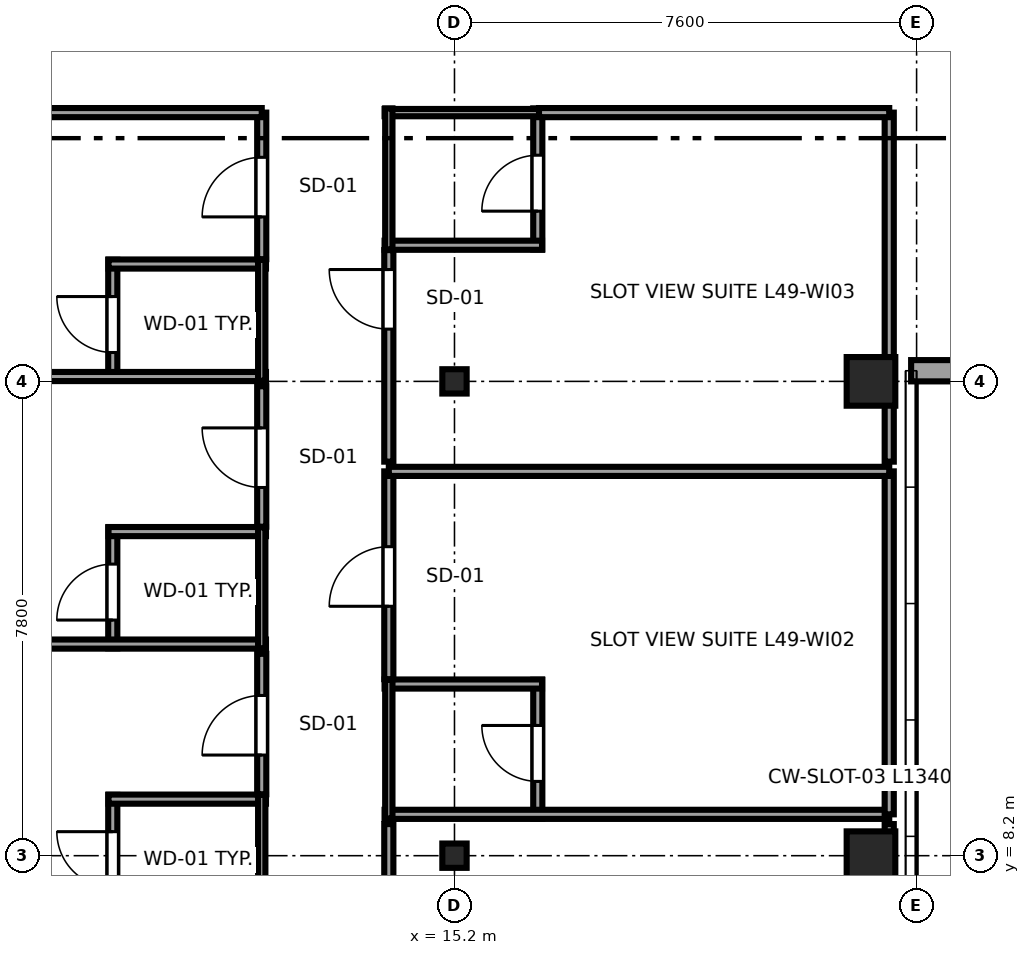
"""IFC4 building model, lengths in metres.
Left out: names, types, materials, properties, quantities, classifications, styles, units other than length and angle.
Written with IfcOpenShell. Run it as: python <this file> out.ifc"""

import sys

from ifc_helpers import new_model, si_unit, direction, frame, frame_2d, origin, origin_2d, place, context, subcontext, project, spatial, rectangle, i_section, extrude, source, transform, mapped, element, fill, save


model = new_model("IFC4")
c1 = context("Model", 3, precision=1e-05, world=origin(), true_north=direction((0.0, 1.0)))
c2 = subcontext(c1, "Body", "Model", "MODEL_VIEW")
j1 = project(units=[si_unit("LENGTHUNIT", "METRE"), si_unit("PLANEANGLEUNIT", "RADIAN")], contexts=[c1])
p1 = place(None, origin())
s1 = spatial("IfcSite", under=j1, at=p1, CompositionType="ELEMENT")
p2 = place(p1, origin())
s2 = spatial("IfcBuilding", under=s1, at=p2, CompositionType="ELEMENT")
p3 = place(p2, frame((0.0, 0.0, 187.55)))
s3 = spatial("IfcBuildingStorey", under=s2, at=p3, CompositionType="ELEMENT", Elevation=187.55)
m1 = source(origin(), c2, "Body", "SweptSolid", [
    extrude(i_section(OverallWidth=0.4, OverallDepth=0.4, WebThickness=0.02, FlangeThickness=0.035, at=origin_2d()), origin(), (0.0, 0.0, 1.0), 3.55),
])
for number, where, z_axis, x_axis in (
    (1, (15.2, 8.2, 0.0), (0.0, 0.0, 1.0), (1.0, 0.0, 0.0)),
    (2, (15.2, 16.0, 0.0), (0.0, 0.0, 1.0), (1.0, 0.0, 0.0)),
):
    element("IfcColumn", number, at=place(p3, frame(where, z_axis=z_axis, x_axis=x_axis)), inside=s3, PredefinedType="COLUMN", context=c2, shape_type="MappedRepresentation", body=[
        mapped(m1, transform((0.0, 0.0, 0.0), x_axis=(1.0, 0.0, 0.0), y_axis=(0.0, 1.0, 0.0), z_axis=(0.0, 0.0, 1.0), scale=1.0)),
    ])
m2 = source(origin(), c2, "Body", "SweptSolid", [
    extrude(rectangle(XDim=0.8, YDim=0.8, at=origin_2d()), origin(), (0.0, 0.0, 1.0), 3.55),
])
for number, where, z_axis, x_axis in (
    (3, (22.05, 8.2, 0.0), (0.0, 0.0, 1.0), (1.0, 0.0, 0.0)),
    (4, (22.05, 16.0, 0.0), (0.0, 0.0, 1.0), (1.0, 0.0, 0.0)),
):
    element("IfcColumn", number, at=place(p3, frame(where, z_axis=z_axis, x_axis=x_axis)), inside=s3, PredefinedType="COLUMN", context=c2, shape_type="MappedRepresentation", body=[
        mapped(m2, transform((0.0, 0.0, 0.0), x_axis=(1.0, 0.0, 0.0), y_axis=(0.0, 1.0, 0.0), z_axis=(0.0, 0.0, 1.0), scale=1.0)),
    ])
p4 = place(p3, frame((22.71, 16.175, 0.0), z_axis=(0.0, 0.0, 1.0), x_axis=(1.0, 0.0, 0.0)))
e5 = element("IfcWall", 5, at=p4, inside=s3, PredefinedType="SOLIDWALL", context=c2, shape_type="SweptSolid", body=[
    extrude(rectangle(XDim=11.58, YDim=0.35, at=frame_2d((5.79, 0.0))), origin(), (0.0, 0.0, 1.0), 2.758),
])
p5 = place(p4, frame((1.995, 0.0, 0.68)))
e6 = element("IfcOpeningElement", 6, at=p5, cuts=e5, PredefinedType="OPENING", context=c2, shape_type="SweptSolid", body=[
    extrude(rectangle(XDim=2.4, YDim=1.9, at=frame_2d((1.2, 0.95))), frame((0.0, 0.185, 0.0), z_axis=(0.0, -1.0, 0.0), x_axis=(1.0, 0.0, 0.0)), (0.0, 0.0, 1.0), 0.37),
])
p6 = place(p4, frame((7.185, 0.0, 0.68)))
e7 = element("IfcOpeningElement", 7, at=p6, cuts=e5, PredefinedType="OPENING", context=c2, shape_type="SweptSolid", body=[
    extrude(rectangle(XDim=2.4, YDim=1.9, at=frame_2d((1.2, 0.95))), frame((0.0, 0.185, 0.0), z_axis=(0.0, -1.0, 0.0), x_axis=(1.0, 0.0, 0.0)), (0.0, 0.0, 1.0), 0.37),
])
p7 = place(p3, frame((9.58, 7.21, 0.0), z_axis=(0.0, 0.0, 1.0), x_axis=(0.0, 1.0, 0.0)))
e8 = element("IfcWall", 8, at=p7, inside=s3, PredefinedType="PARTITIONING", context=c2, shape_type="SweptSolid", body=[
    extrude(rectangle(XDim=1.99, YDim=0.15, at=frame_2d((0.995, 0.0))), origin(), (0.0, 0.0, 1.0), 3.37),
])
p8 = place(p7, frame((0.465, 0.0, 0.0)))
e9 = element("IfcOpeningElement", 9, at=p8, cuts=e8, PredefinedType="OPENING", context=c2, shape_type="SweptSolid", body=[
    extrude(rectangle(XDim=0.92, YDim=2.01, at=frame_2d((0.46, 1.005))), frame((0.0, 0.085, 0.0), z_axis=(0.0, -1.0, 0.0), x_axis=(1.0, 0.0, 0.0)), (0.0, 0.0, 1.0), 0.17),
])
p9 = place(p3, frame((9.51, 9.13, 0.0), z_axis=(0.0, 0.0, 1.0), x_axis=(1.0, 0.0, 0.0)))
e10 = element("IfcWall", 10, at=p9, inside=s3, PredefinedType="PARTITIONING", context=c2, shape_type="SweptSolid", body=[
    extrude(rectangle(XDim=2.59, YDim=0.15, at=frame_2d((1.295, 0.0))), origin(), (0.0, 0.0, 1.0), 3.37),
])
p10 = place(p3, frame((12.03, 7.21, 0.0), z_axis=(0.0, 0.0, 1.0), x_axis=(0.0, 1.0, 0.0)))
e11 = element("IfcWall", 11, at=p10, inside=s3, PredefinedType="PLUMBINGWALL", context=c2, shape_type="SweptSolid", body=[
    extrude(rectangle(XDim=1.99, YDim=0.12, at=frame_2d((0.995, 0.0))), origin(), (0.0, 0.0, 1.0), 3.37),
])
p11 = place(p3, frame((9.58, 11.61, 0.0), z_axis=(0.0, 0.0, 1.0), x_axis=(0.0, 1.0, 0.0)))
e12 = element("IfcWall", 12, at=p11, inside=s3, PredefinedType="PARTITIONING", context=c2, shape_type="SweptSolid", body=[
    extrude(rectangle(XDim=1.99, YDim=0.15, at=frame_2d((0.995, 0.0))), origin(), (0.0, 0.0, 1.0), 3.37),
])
p12 = place(p11, frame((0.465, 0.0, 0.0)))
e13 = element("IfcOpeningElement", 13, at=p12, cuts=e12, PredefinedType="OPENING", context=c2, shape_type="SweptSolid", body=[
    extrude(rectangle(XDim=0.92, YDim=2.01, at=frame_2d((0.46, 1.005))), frame((0.0, 0.085, 0.0), z_axis=(0.0, -1.0, 0.0), x_axis=(1.0, 0.0, 0.0)), (0.0, 0.0, 1.0), 0.17),
])
p13 = place(p3, frame((3.005, 11.68, 0.0), z_axis=(0.0, 0.0, 1.0), x_axis=(1.0, 0.0, 0.0)))
e14 = element("IfcWall", 14, at=p13, inside=s3, PredefinedType="PARTITIONING", context=c2, shape_type="SweptSolid", body=[
    extrude(rectangle(XDim=9.095, YDim=0.15, at=frame_2d((4.548, 0.0))), origin(), (0.0, 0.0, 1.0), 3.37),
])
p14 = place(p3, frame((9.51, 13.53, 0.0), z_axis=(0.0, 0.0, 1.0), x_axis=(1.0, 0.0, 0.0)))
e15 = element("IfcWall", 15, at=p14, inside=s3, PredefinedType="PARTITIONING", context=c2, shape_type="SweptSolid", body=[
    extrude(rectangle(XDim=2.59, YDim=0.15, at=frame_2d((1.295, 0.0))), origin(), (0.0, 0.0, 1.0), 3.37),
])
p15 = place(p3, frame((12.03, 11.61, 0.0), z_axis=(0.0, 0.0, 1.0), x_axis=(0.0, 1.0, 0.0)))
e16 = element("IfcWall", 16, at=p15, inside=s3, PredefinedType="PLUMBINGWALL", context=c2, shape_type="SweptSolid", body=[
    extrude(rectangle(XDim=1.99, YDim=0.12, at=frame_2d((0.995, 0.0))), origin(), (0.0, 0.0, 1.0), 3.37),
])
p16 = place(p3, frame((9.58, 16.01, 0.0), z_axis=(0.0, 0.0, 1.0), x_axis=(0.0, 1.0, 0.0)))
e17 = element("IfcWall", 17, at=p16, inside=s3, PredefinedType="PARTITIONING", context=c2, shape_type="SweptSolid", body=[
    extrude(rectangle(XDim=1.99, YDim=0.15, at=frame_2d((0.995, 0.0))), origin(), (0.0, 0.0, 1.0), 3.37),
])
p17 = place(p16, frame((0.465, 0.0, 0.0)))
e18 = element("IfcOpeningElement", 18, at=p17, cuts=e17, PredefinedType="OPENING", context=c2, shape_type="SweptSolid", body=[
    extrude(rectangle(XDim=0.92, YDim=2.01, at=frame_2d((0.46, 1.005))), frame((0.0, 0.085, 0.0), z_axis=(0.0, -1.0, 0.0), x_axis=(1.0, 0.0, 0.0)), (0.0, 0.0, 1.0), 0.17),
])
p18 = place(p3, frame((3.005, 16.08, 0.0), z_axis=(0.0, 0.0, 1.0), x_axis=(1.0, 0.0, 0.0)))
e19 = element("IfcWall", 19, at=p18, inside=s3, PredefinedType="PARTITIONING", context=c2, shape_type="SweptSolid", body=[
    extrude(rectangle(XDim=9.095, YDim=0.15, at=frame_2d((4.548, 0.0))), origin(), (0.0, 0.0, 1.0), 2.758),
])
p19 = place(p3, frame((9.51, 17.93, 0.0), z_axis=(0.0, 0.0, 1.0), x_axis=(1.0, 0.0, 0.0)))
e20 = element("IfcWall", 20, at=p19, inside=s3, PredefinedType="PARTITIONING", context=c2, shape_type="SweptSolid", body=[
    extrude(rectangle(XDim=2.59, YDim=0.15, at=frame_2d((1.295, 0.0))), origin(), (0.0, 0.0, 1.0), 3.37),
])
p20 = place(p3, frame((12.03, 16.01, 0.0), z_axis=(0.0, 0.0, 1.0), x_axis=(0.0, 1.0, 0.0)))
e21 = element("IfcWall", 21, at=p20, inside=s3, PredefinedType="PLUMBINGWALL", context=c2, shape_type="SweptSolid", body=[
    extrude(rectangle(XDim=1.99, YDim=0.12, at=frame_2d((0.995, 0.0))), origin(), (0.0, 0.0, 1.0), 3.37),
])
p21 = place(p3, frame((16.57, 8.81, 0.0), z_axis=(0.0, 0.0, 1.0), x_axis=(0.0, 1.0, 0.0)))
e22 = element("IfcWall", 22, at=p21, inside=s3, PredefinedType="PARTITIONING", context=c2, shape_type="SweptSolid", body=[
    extrude(rectangle(XDim=2.283, YDim=0.15, at=frame_2d((1.142, 0.0))), origin(), (0.0, 0.0, 1.0), 3.37),
])
p22 = place(p21, frame((0.612, 0.0, 0.0)))
e23 = element("IfcOpeningElement", 23, at=p22, cuts=e22, PredefinedType="OPENING", context=c2, shape_type="SweptSolid", body=[
    extrude(rectangle(XDim=0.92, YDim=2.01, at=frame_2d((0.46, 1.005))), frame((0.0, 0.085, 0.0), z_axis=(0.0, -1.0, 0.0), x_axis=(1.0, 0.0, 0.0)), (0.0, 0.0, 1.0), 0.17),
])
p23 = place(p3, frame((14.05, 8.88, 0.0), z_axis=(0.0, 0.0, 1.0), x_axis=(1.0, 0.0, 0.0)))
e24 = element("IfcWall", 24, at=p23, inside=s3, PredefinedType="PARTITIONING", context=c2, shape_type="SweptSolid", body=[
    extrude(rectangle(XDim=8.3, YDim=0.15, at=frame_2d((4.15, 0.0))), origin(), (0.0, 0.0, 1.0), 3.37),
])
p24 = place(p3, frame((14.05, 11.023, 0.0), z_axis=(0.0, 0.0, 1.0), x_axis=(1.0, 0.0, 0.0)))
e25 = element("IfcWall", 25, at=p24, inside=s3, PredefinedType="PARTITIONING", context=c2, shape_type="SweptSolid", body=[
    extrude(rectangle(XDim=2.59, YDim=0.15, at=frame_2d((1.295, 0.0))), origin(), (0.0, 0.0, 1.0), 3.37),
])
p25 = place(p3, frame((14.12, 8.81, 0.0), z_axis=(0.0, 0.0, 1.0), x_axis=(0.0, 1.0, 0.0)))
e26 = element("IfcWall", 26, at=p25, inside=s3, PredefinedType="PLUMBINGWALL", context=c2, shape_type="SweptSolid", body=[
    extrude(rectangle(XDim=2.283, YDim=0.12, at=frame_2d((1.142, 0.0))), origin(), (0.0, 0.0, 1.0), 3.37),
])
p26 = place(p3, frame((16.57, 18.169, 0.0), z_axis=(0.0, 0.0, 1.0), x_axis=(0.0, 1.0, 0.0)))
e27 = element("IfcWall", 27, at=p26, inside=s3, PredefinedType="PARTITIONING", context=c2, shape_type="SweptSolid", body=[
    extrude(rectangle(XDim=2.321, YDim=0.15, at=frame_2d((1.161, 0.0))), origin(), (0.0, 0.0, 1.0), 3.37),
])
p27 = place(p26, frame((0.631, 0.0, 0.0)))
e28 = element("IfcOpeningElement", 28, at=p27, cuts=e27, PredefinedType="OPENING", context=c2, shape_type="SweptSolid", body=[
    extrude(rectangle(XDim=0.92, YDim=2.01, at=frame_2d((0.46, 1.005))), frame((0.0, 0.085, 0.0), z_axis=(0.0, -1.0, 0.0), x_axis=(1.0, 0.0, 0.0)), (0.0, 0.0, 1.0), 0.17),
])
p28 = place(p3, frame((14.05, 18.239, 0.0), z_axis=(0.0, 0.0, 1.0), x_axis=(1.0, 0.0, 0.0)))
e29 = element("IfcWall", 29, at=p28, inside=s3, PredefinedType="PARTITIONING", context=c2, shape_type="SweptSolid", body=[
    extrude(rectangle(XDim=2.59, YDim=0.15, at=frame_2d((1.295, 0.0))), origin(), (0.0, 0.0, 1.0), 3.37),
])
p29 = place(p3, frame((14.05, 20.42, 0.0), z_axis=(0.0, 0.0, 1.0), x_axis=(1.0, 0.0, 0.0)))
e30 = element("IfcWall", 30, at=p29, inside=s3, PredefinedType="PLUMBINGWALL", context=c2, shape_type="SweptSolid", body=[
    extrude(rectangle(XDim=2.59, YDim=0.12, at=frame_2d((1.295, 0.0))), origin(), (0.0, 0.0, 1.0), 3.37),
])
p30 = place(p3, frame((14.12, 18.169, 0.0), z_axis=(0.0, 0.0, 1.0), x_axis=(0.0, 1.0, 0.0)))
e31 = element("IfcWall", 31, at=p30, inside=s3, PredefinedType="PLUMBINGWALL", context=c2, shape_type="SweptSolid", body=[
    extrude(rectangle(XDim=2.321, YDim=0.12, at=frame_2d((1.161, 0.0))), origin(), (0.0, 0.0, 1.0), 3.37),
])
p31 = place(p3, frame((12.03, 9.21, 0.0), z_axis=(0.0, 0.0, 1.0), x_axis=(0.0, 1.0, 0.0)))
e32 = element("IfcWall", 32, at=p31, inside=s3, PredefinedType="PARTITIONING", context=c2, shape_type="SweptSolid", body=[
    extrude(rectangle(XDim=2.31, YDim=0.15, at=frame_2d((1.155, 0.0))), origin(), (0.0, 0.0, 1.0), 3.37),
])
p32 = place(p31, frame((0.645, 0.0, 0.0)))
e33 = element("IfcOpeningElement", 33, at=p32, cuts=e32, PredefinedType="OPENING", context=c2, shape_type="SweptSolid", body=[
    extrude(rectangle(XDim=0.98, YDim=2.12, at=frame_2d((0.49, 1.06))), frame((0.0, 0.085, 0.0), z_axis=(0.0, -1.0, 0.0), x_axis=(1.0, 0.0, 0.0)), (0.0, 0.0, 1.0), 0.17),
])
p33 = place(p3, frame((12.03, 13.61, 0.0), z_axis=(0.0, 0.0, 1.0), x_axis=(0.0, 1.0, 0.0)))
e34 = element("IfcWall", 34, at=p33, inside=s3, PredefinedType="PARTITIONING", context=c2, shape_type="SweptSolid", body=[
    extrude(rectangle(XDim=2.31, YDim=0.15, at=frame_2d((1.155, 0.0))), origin(), (0.0, 0.0, 1.0), 3.37),
])
p34 = place(p33, frame((0.645, 0.0, 0.0)))
e35 = element("IfcOpeningElement", 35, at=p34, cuts=e34, PredefinedType="OPENING", context=c2, shape_type="SweptSolid", body=[
    extrude(rectangle(XDim=0.98, YDim=2.12, at=frame_2d((0.49, 1.06))), frame((0.0, 0.085, 0.0), z_axis=(0.0, -1.0, 0.0), x_axis=(1.0, 0.0, 0.0)), (0.0, 0.0, 1.0), 0.17),
])
p35 = place(p3, frame((12.03, 18.01, 0.0), z_axis=(0.0, 0.0, 1.0), x_axis=(0.0, 1.0, 0.0)))
e36 = element("IfcWall", 36, at=p35, inside=s3, PredefinedType="PARTITIONING", context=c2, shape_type="SweptSolid", body=[
    extrude(rectangle(XDim=2.41, YDim=0.15, at=frame_2d((1.205, 0.0))), origin(), (0.0, 0.0, 1.0), 3.37),
])
p36 = place(p35, frame((0.695, 0.0, 0.0)))
e37 = element("IfcOpeningElement", 37, at=p36, cuts=e36, PredefinedType="OPENING", context=c2, shape_type="SweptSolid", body=[
    extrude(rectangle(XDim=0.98, YDim=2.12, at=frame_2d((0.49, 1.06))), frame((0.0, 0.085, 0.0), z_axis=(0.0, -1.0, 0.0), x_axis=(1.0, 0.0, 0.0)), (0.0, 0.0, 1.0), 0.17),
])
p37 = place(p3, frame((3.005, 20.42, 0.0), z_axis=(0.0, 0.0, 1.0), x_axis=(1.0, 0.0, 0.0)))
e38 = element("IfcWall", 38, at=p37, inside=s3, PredefinedType="PARTITIONING", context=c2, shape_type="SweptSolid", body=[
    extrude(rectangle(XDim=9.025, YDim=0.15, at=frame_2d((4.513, 0.0))), origin(), (0.0, 0.0, 1.0), 3.37),
])
p38 = place(p3, frame((14.12, 5.867, 0.0), z_axis=(0.0, 0.0, 1.0), x_axis=(0.0, 1.0, 0.0)))
e39 = element("IfcWall", 39, at=p38, inside=s3, PredefinedType="PARTITIONING", context=c2, shape_type="SweptSolid", body=[
    extrude(rectangle(XDim=2.853, YDim=0.15, at=frame_2d((1.427, 0.0))), origin(), (0.0, 0.0, 1.0), 3.37),
])
p39 = place(p38, frame((0.316, 0.0, 0.0)))
e40 = element("IfcOpeningElement", 40, at=p39, cuts=e39, PredefinedType="OPENING", context=c2, shape_type="SweptSolid", body=[
    extrude(rectangle(XDim=0.98, YDim=2.12, at=frame_2d((0.49, 1.06))), frame((0.0, 0.085, 0.0), z_axis=(0.0, -1.0, 0.0), x_axis=(1.0, 0.0, 0.0)), (0.0, 0.0, 1.0), 0.17),
])
p40 = place(p3, frame((22.35, 3.005, 0.0), z_axis=(0.0, 0.0, 1.0), x_axis=(0.0, 1.0, 0.0)))
e41 = element("IfcWall", 41, at=p40, inside=s3, PredefinedType="PARTITIONING", context=c2, shape_type="SweptSolid", body=[
    extrude(rectangle(XDim=5.715, YDim=0.15, at=frame_2d((2.857, 0.0))), origin(), (0.0, 0.0, 1.0), 3.37),
])
p41 = place(p3, frame((14.12, 11.103, 0.0), z_axis=(0.0, 0.0, 1.0), x_axis=(0.0, 1.0, 0.0)))
e42 = element("IfcWall", 42, at=p41, inside=s3, PredefinedType="PARTITIONING", context=c2, shape_type="SweptSolid", body=[
    extrude(rectangle(XDim=3.417, YDim=0.15, at=frame_2d((1.708, 0.0))), origin(), (0.0, 0.0, 1.0), 3.37),
])
p42 = place(p41, frame((1.198, 0.0, 0.0)))
e43 = element("IfcOpeningElement", 43, at=p42, cuts=e42, PredefinedType="OPENING", context=c2, shape_type="SweptSolid", body=[
    extrude(rectangle(XDim=0.98, YDim=2.12, at=frame_2d((0.49, 1.06))), frame((0.0, 0.085, 0.0), z_axis=(0.0, -1.0, 0.0), x_axis=(1.0, 0.0, 0.0)), (0.0, 0.0, 1.0), 0.17),
])
p43 = place(p3, frame((22.35, 8.88, 0.0), z_axis=(0.0, 0.0, 1.0), x_axis=(0.0, 1.0, 0.0)))
e44 = element("IfcWall", 44, at=p43, inside=s3, PredefinedType="PARTITIONING", context=c2, shape_type="SweptSolid", body=[
    extrude(rectangle(XDim=5.64, YDim=0.15, at=frame_2d((2.82, 0.0))), origin(), (0.0, 0.0, 1.0), 3.37),
])
p44 = place(p3, frame((14.12, 14.52, 0.0), z_axis=(0.0, 0.0, 1.0), x_axis=(1.0, 0.0, 0.0)))
e45 = element("IfcWall", 45, at=p44, inside=s3, PredefinedType="PARTITIONING", context=c2, shape_type="SweptSolid", body=[
    extrude(rectangle(XDim=8.23, YDim=0.15, at=frame_2d((4.115, 0.0))), origin(), (0.0, 0.0, 1.0), 3.37),
])
p45 = place(p3, frame((14.12, 14.68, 0.0), z_axis=(0.0, 0.0, 1.0), x_axis=(0.0, 1.0, 0.0)))
e46 = element("IfcWall", 46, at=p45, inside=s3, PredefinedType="PARTITIONING", context=c2, shape_type="SweptSolid", body=[
    extrude(rectangle(XDim=3.479, YDim=0.15, at=frame_2d((1.74, 0.0))), origin(), (0.0, 0.0, 1.0), 3.37),
])
p46 = place(p45, frame((2.179, 0.0, 0.0)))
e47 = element("IfcOpeningElement", 47, at=p46, cuts=e46, PredefinedType="OPENING", context=c2, shape_type="SweptSolid", body=[
    extrude(rectangle(XDim=0.98, YDim=2.12, at=frame_2d((0.49, 1.06))), frame((0.0, 0.085, 0.0), z_axis=(0.0, -1.0, 0.0), x_axis=(1.0, 0.0, 0.0)), (0.0, 0.0, 1.0), 0.17),
])
p47 = place(p3, frame((22.35, 14.68, 0.0), z_axis=(0.0, 0.0, 1.0), x_axis=(0.0, 1.0, 0.0)))
e48 = element("IfcWall", 48, at=p47, inside=s3, PredefinedType="PARTITIONING", context=c2, shape_type="SweptSolid", body=[
    extrude(rectangle(XDim=5.74, YDim=0.15, at=frame_2d((2.87, 0.0))), origin(), (0.0, 0.0, 1.0), 3.37),
])
p48 = place(p3, frame((16.59, 20.42, 0.0), z_axis=(0.0, 0.0, 1.0), x_axis=(1.0, 0.0, 0.0)))
e49 = element("IfcWall", 49, at=p48, inside=s3, PredefinedType="PARTITIONING", context=c2, shape_type="SweptSolid", body=[
    extrude(rectangle(XDim=5.76, YDim=0.15, at=frame_2d((2.88, 0.0))), origin(), (0.0, 0.0, 1.0), 3.37),
])
m3 = source(origin(), c2, "Body", "SweptSolid", [
    extrude(rectangle(XDim=0.92, YDim=2.01, at=frame_2d((0.46, 1.005))), frame((0.0, 0.025, 0.0), z_axis=(0.0, -1.0, 0.0), x_axis=(1.0, 0.0, 0.0)), (0.0, 0.0, 1.0), 0.05),
])
p49 = place(p8, origin())
e50 = element("IfcDoor", 50, at=p49, inside=s3, OperationType="SINGLE_SWING_RIGHT", PredefinedType="DOOR", context=c2, shape_type="MappedRepresentation", body=[
    mapped(m3, transform((0.0, 0.0, 0.0), x_axis=(1.0, 0.0, 0.0), y_axis=(0.0, 1.0, 0.0), z_axis=(0.0, 0.0, 1.0), scale=1.0)),
])
fill(e9, e50)
p50 = place(p12, origin())
e51 = element("IfcDoor", 51, at=p50, inside=s3, OperationType="SINGLE_SWING_LEFT", PredefinedType="DOOR", context=c2, shape_type="MappedRepresentation", body=[
    mapped(m3, transform((0.0, 0.0, 0.0), x_axis=(1.0, 0.0, 0.0), y_axis=(0.0, 1.0, 0.0), z_axis=(0.0, 0.0, 1.0), scale=1.0)),
])
fill(e13, e51)
p51 = place(p17, origin())
e52 = element("IfcDoor", 52, at=p51, inside=s3, OperationType="SINGLE_SWING_RIGHT", PredefinedType="DOOR", context=c2, shape_type="MappedRepresentation", body=[
    mapped(m3, transform((0.0, 0.0, 0.0), x_axis=(1.0, 0.0, 0.0), y_axis=(0.0, 1.0, 0.0), z_axis=(0.0, 0.0, 1.0), scale=1.0)),
])
fill(e18, e52)
p52 = place(p22, origin())
e53 = element("IfcDoor", 53, at=p52, inside=s3, OperationType="SINGLE_SWING_RIGHT", PredefinedType="DOOR", context=c2, shape_type="MappedRepresentation", body=[
    mapped(m3, transform((0.0, 0.0, 0.0), x_axis=(1.0, 0.0, 0.0), y_axis=(0.0, 1.0, 0.0), z_axis=(0.0, 0.0, 1.0), scale=1.0)),
])
fill(e23, e53)
p53 = place(p27, origin())
e54 = element("IfcDoor", 54, at=p53, inside=s3, OperationType="SINGLE_SWING_LEFT", PredefinedType="DOOR", context=c2, shape_type="MappedRepresentation", body=[
    mapped(m3, transform((0.0, 0.0, 0.0), x_axis=(1.0, 0.0, 0.0), y_axis=(0.0, 1.0, 0.0), z_axis=(0.0, 0.0, 1.0), scale=1.0)),
])
fill(e28, e54)
m4 = source(origin(), c2, "Body", "SweptSolid", [
    extrude(rectangle(XDim=0.98, YDim=2.12, at=frame_2d((0.49, 1.06))), frame((0.0, 0.025, 0.0), z_axis=(0.0, -1.0, 0.0), x_axis=(1.0, 0.0, 0.0)), (0.0, 0.0, 1.0), 0.05),
])
p54 = place(p32, origin())
e55 = element("IfcDoor", 55, at=p54, inside=s3, OperationType="SINGLE_SWING_LEFT", PredefinedType="DOOR", context=c2, shape_type="MappedRepresentation", body=[
    mapped(m4, transform((0.0, 0.0, 0.0), x_axis=(1.0, 0.0, 0.0), y_axis=(0.0, 1.0, 0.0), z_axis=(0.0, 0.0, 1.0), scale=1.0)),
])
fill(e33, e55)
p55 = place(p34, origin())
e56 = element("IfcDoor", 56, at=p55, inside=s3, OperationType="SINGLE_SWING_RIGHT", PredefinedType="DOOR", context=c2, shape_type="MappedRepresentation", body=[
    mapped(m4, transform((0.0, 0.0, 0.0), x_axis=(1.0, 0.0, 0.0), y_axis=(0.0, 1.0, 0.0), z_axis=(0.0, 0.0, 1.0), scale=1.0)),
])
fill(e35, e56)
p56 = place(p36, origin())
e57 = element("IfcDoor", 57, at=p56, inside=s3, OperationType="SINGLE_SWING_LEFT", PredefinedType="DOOR", context=c2, shape_type="MappedRepresentation", body=[
    mapped(m4, transform((0.0, 0.0, 0.0), x_axis=(1.0, 0.0, 0.0), y_axis=(0.0, 1.0, 0.0), z_axis=(0.0, 0.0, 1.0), scale=1.0)),
])
fill(e37, e57)
p57 = place(p42, origin())
e58 = element("IfcDoor", 58, at=p57, inside=s3, OperationType="SINGLE_SWING_LEFT", PredefinedType="DOOR", context=c2, shape_type="MappedRepresentation", body=[
    mapped(m4, transform((0.0, 0.0, 0.0), x_axis=(1.0, 0.0, 0.0), y_axis=(0.0, 1.0, 0.0), z_axis=(0.0, 0.0, 1.0), scale=1.0)),
])
fill(e43, e58)
p58 = place(p46, origin())
e59 = element("IfcDoor", 59, at=p58, inside=s3, OperationType="SINGLE_SWING_RIGHT", PredefinedType="DOOR", context=c2, shape_type="MappedRepresentation", body=[
    mapped(m4, transform((0.0, 0.0, 0.0), x_axis=(1.0, 0.0, 0.0), y_axis=(0.0, 1.0, 0.0), z_axis=(0.0, 0.0, 1.0), scale=1.0)),
])
fill(e47, e59)
save(model, sys.argv[1])
